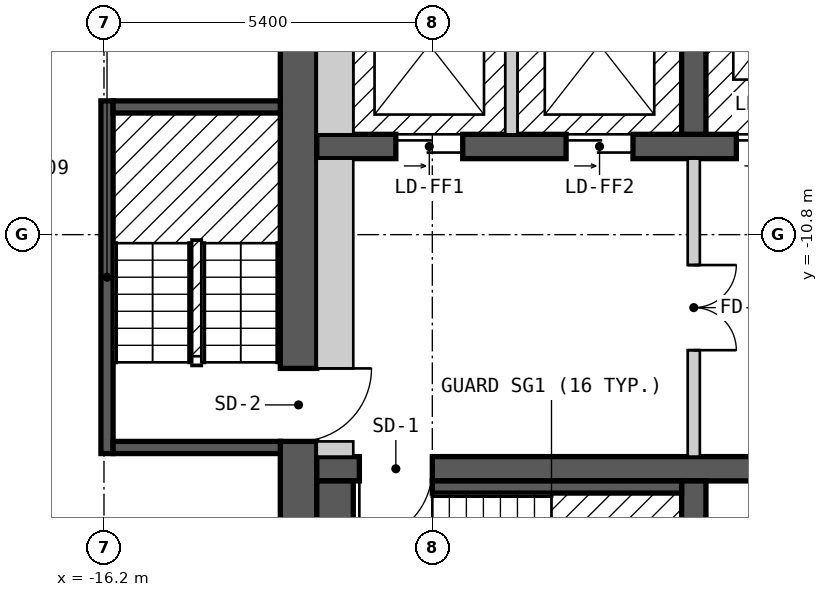
"""IFC4 building model, lengths in metres.
Left out: names, types, materials, properties, quantities, classifications, styles, units other than length and angle.
Written with IfcOpenShell. Run it as: python <this file> out.ifc"""

import sys

from ifc_helpers import new_model, si_unit, direction, frame, frame_2d, origin, origin_2d, place, context, subcontext, project, spatial, polyline, rectangle, outline, extrude, element, fill, save


model = new_model("IFC4")
c1 = context("Model", 3, precision=1e-05, world=origin(), true_north=direction((0.0, 1.0)))
c2 = subcontext(c1, "Body", "Model", "MODEL_VIEW")
j1 = project(units=[si_unit("LENGTHUNIT", "METRE"), si_unit("PLANEANGLEUNIT", "RADIAN")], contexts=[c1])
p1 = place(None, origin())
s1 = spatial("IfcSite", under=j1, at=p1, CompositionType="ELEMENT")
p2 = place(p1, origin())
s2 = spatial("IfcBuilding", under=s1, at=p2, CompositionType="ELEMENT")
p3 = place(p2, frame((0.0, 0.0, 163.2)))
s3 = spatial("IfcBuildingStorey", under=s2, at=p3, CompositionType="ELEMENT", Elevation=163.2)
p4 = place(p3, frame((-17.53, -15.736, 0.0), z_axis=(0.0, 0.0, 1.0), x_axis=(0.5, -0.866025403784, 0.0)))
e1 = element("IfcColumn", 1, at=p4, inside=s3, PredefinedType="COLUMN", context=c2, shape_type="SweptSolid", body=[
    extrude(rectangle(XDim=0.8, YDim=0.8, at=origin_2d()), origin(), (0.0, 0.0, 1.0), 3.0),
])
p5 = place(p3, frame((-13.0, -18.4, 0.0), z_axis=(0.0, 0.0, 1.0), x_axis=(0.0, 1.0, 0.0)))
e2 = element("IfcWall", 2, at=p5, inside=s3, PredefinedType="SHEAR", context=c2, shape_type="SweptSolid", body=[
    extrude(rectangle(XDim=12.8, YDim=0.6, at=frame_2d((6.4, 0.0))), origin(), (0.0, 0.0, 1.0), 2.7),
])
p6 = place(p5, frame((4.2, 0.0, 0.0)))
e3 = element("IfcOpeningElement", 3, at=p6, cuts=e2, PredefinedType="OPENING", context=c2, shape_type="SweptSolid", body=[
    extrude(rectangle(XDim=1.2, YDim=2.1, at=frame_2d((0.6, 1.05))), frame((0.0, 0.31, 0.0), z_axis=(0.0, -1.0, 0.0), x_axis=(1.0, 0.0, 0.0)), (0.0, 0.0, 1.0), 0.62),
])
p7 = place(p3, frame((-12.7, -14.65, 0.0), z_axis=(0.0, 0.0, 1.0), x_axis=(1.0, 0.0, 0.0)))
e4 = element("IfcWall", 4, at=p7, inside=s3, PredefinedType="SHEAR", context=c2, shape_type="SweptSolid", body=[
    extrude(rectangle(XDim=25.4, YDim=0.4, at=frame_2d((12.7, 0.0))), origin(), (0.0, 0.0, 1.0), 2.7),
])
p8 = place(p7, frame((1.9, 0.0, 0.0), z_axis=(0.0, 0.0, 1.0), x_axis=(-1.0, 0.0, 0.0)))
e5 = element("IfcOpeningElement", 5, at=p8, cuts=e4, PredefinedType="OPENING", context=c2, shape_type="SweptSolid", body=[
    extrude(rectangle(XDim=1.2, YDim=2.1, at=frame_2d((0.6, 1.05))), frame((0.0, 0.21, 0.0), z_axis=(0.0, -1.0, 0.0), x_axis=(1.0, 0.0, 0.0)), (0.0, 0.0, 1.0), 0.42),
])
p9 = place(p7, frame((24.75, 0.0, 0.0), z_axis=(0.0, 0.0, 1.0), x_axis=(-1.0, 0.0, 0.0)))
e6 = element("IfcOpeningElement", 6, at=p9, cuts=e4, PredefinedType="OPENING", context=c2, shape_type="SweptSolid", body=[
    extrude(rectangle(XDim=1.2, YDim=2.1, at=frame_2d((0.6, 1.05))), frame((0.0, 0.21, 0.0), z_axis=(0.0, -1.0, 0.0), x_axis=(1.0, 0.0, 0.0)), (0.0, 0.0, 1.0), 0.42),
])
p10 = place(p7, frame((8.6, 0.0, 0.0), z_axis=(0.0, 0.0, 1.0), x_axis=(-1.0, 0.0, 0.0)))
e7 = element("IfcOpeningElement", 7, at=p10, cuts=e4, PredefinedType="OPENING", context=c2, shape_type="SweptSolid", body=[
    extrude(rectangle(XDim=1.0, YDim=2.1, at=frame_2d((0.5, 1.05))), frame((0.0, 0.21, 0.0), z_axis=(0.0, -1.0, 0.0), x_axis=(1.0, 0.0, 0.0)), (0.0, 0.0, 1.0), 0.42),
])
p11 = place(p7, frame((11.35, 0.0, 0.0), z_axis=(0.0, 0.0, 1.0), x_axis=(-1.0, 0.0, 0.0)))
e8 = element("IfcOpeningElement", 8, at=p11, cuts=e4, PredefinedType="OPENING", context=c2, shape_type="SweptSolid", body=[
    extrude(rectangle(XDim=0.9, YDim=2.1, at=frame_2d((0.45, 1.05))), frame((0.0, 0.21, 0.0), z_axis=(0.0, -1.0, 0.0), x_axis=(1.0, 0.0, 0.0)), (0.0, 0.0, 1.0), 0.42),
])
p12 = place(p7, frame((14.15, 0.0, 0.0), z_axis=(0.0, 0.0, 1.0), x_axis=(-1.0, 0.0, 0.0)))
e9 = element("IfcOpeningElement", 9, at=p12, cuts=e4, PredefinedType="OPENING", context=c2, shape_type="SweptSolid", body=[
    extrude(rectangle(XDim=1.0, YDim=2.1, at=frame_2d((0.5, 1.05))), frame((0.0, 0.21, 0.0), z_axis=(0.0, -1.0, 0.0), x_axis=(1.0, 0.0, 0.0)), (0.0, 0.0, 1.0), 0.42),
])
p13 = place(p7, frame((17.75, 0.0, 0.0), z_axis=(0.0, 0.0, 1.0), x_axis=(-1.0, 0.0, 0.0)))
e10 = element("IfcOpeningElement", 10, at=p13, cuts=e4, PredefinedType="OPENING", context=c2, shape_type="SweptSolid", body=[
    extrude(rectangle(XDim=1.0, YDim=2.1, at=frame_2d((0.5, 1.05))), frame((0.0, 0.21, 0.0), z_axis=(0.0, -1.0, 0.0), x_axis=(1.0, 0.0, 0.0)), (0.0, 0.0, 1.0), 0.42),
])
p14 = place(p3, frame((-12.7, -9.35, 0.0), z_axis=(0.0, 0.0, 1.0), x_axis=(1.0, 0.0, 0.0)))
e11 = element("IfcWall", 11, at=p14, inside=s3, PredefinedType="SHEAR", context=c2, shape_type="SweptSolid", body=[
    extrude(rectangle(XDim=22.9, YDim=0.4, at=frame_2d((11.45, 0.0))), origin(), (0.0, 0.0, 1.0), 2.7),
])
p15 = place(p14, frame((1.3, 0.0, 0.0)))
e12 = element("IfcOpeningElement", 12, at=p15, cuts=e11, PredefinedType="OPENING", context=c2, shape_type="SweptSolid", body=[
    extrude(rectangle(XDim=1.1, YDim=2.1, at=frame_2d((0.55, 1.05))), frame((0.0, 0.21, 0.0), z_axis=(0.0, -1.0, 0.0), x_axis=(1.0, 0.0, 0.0)), (0.0, 0.0, 1.0), 0.42),
])
p16 = place(p14, frame((4.1, 0.0, 0.0)))
e13 = element("IfcOpeningElement", 13, at=p16, cuts=e11, PredefinedType="OPENING", context=c2, shape_type="SweptSolid", body=[
    extrude(rectangle(XDim=1.1, YDim=2.1, at=frame_2d((0.55, 1.05))), frame((0.0, 0.21, 0.0), z_axis=(0.0, -1.0, 0.0), x_axis=(1.0, 0.0, 0.0)), (0.0, 0.0, 1.0), 0.42),
])
p17 = place(p14, frame((6.9, 0.0, 0.0)))
e14 = element("IfcOpeningElement", 14, at=p17, cuts=e11, PredefinedType="OPENING", context=c2, shape_type="SweptSolid", body=[
    extrude(rectangle(XDim=1.1, YDim=2.1, at=frame_2d((0.55, 1.05))), frame((0.0, 0.21, 0.0), z_axis=(0.0, -1.0, 0.0), x_axis=(1.0, 0.0, 0.0)), (0.0, 0.0, 1.0), 0.42),
])
p18 = place(p14, frame((9.2, 0.0, 0.0)))
e15 = element("IfcOpeningElement", 15, at=p18, cuts=e11, PredefinedType="OPENING", context=c2, shape_type="SweptSolid", body=[
    extrude(rectangle(XDim=1.1, YDim=2.1, at=frame_2d((0.55, 1.05))), frame((0.0, 0.21, 0.0), z_axis=(0.0, -1.0, 0.0), x_axis=(1.0, 0.0, 0.0)), (0.0, 0.0, 1.0), 0.42),
])
p19 = place(p14, frame((11.5, 0.0, 0.0)))
e16 = element("IfcOpeningElement", 16, at=p19, cuts=e11, PredefinedType="OPENING", context=c2, shape_type="SweptSolid", body=[
    extrude(rectangle(XDim=1.1, YDim=2.1, at=frame_2d((0.55, 1.05))), frame((0.0, 0.21, 0.0), z_axis=(0.0, -1.0, 0.0), x_axis=(1.0, 0.0, 0.0)), (0.0, 0.0, 1.0), 0.42),
])
p20 = place(p14, frame((13.8, 0.0, 0.0)))
e17 = element("IfcOpeningElement", 17, at=p20, cuts=e11, PredefinedType="OPENING", context=c2, shape_type="SweptSolid", body=[
    extrude(rectangle(XDim=1.1, YDim=2.1, at=frame_2d((0.55, 1.05))), frame((0.0, 0.21, 0.0), z_axis=(0.0, -1.0, 0.0), x_axis=(1.0, 0.0, 0.0)), (0.0, 0.0, 1.0), 0.42),
])
p21 = place(p14, frame((16.1, 0.0, 0.0)))
e18 = element("IfcOpeningElement", 18, at=p21, cuts=e11, PredefinedType="OPENING", context=c2, shape_type="SweptSolid", body=[
    extrude(rectangle(XDim=1.1, YDim=2.1, at=frame_2d((0.55, 1.05))), frame((0.0, 0.21, 0.0), z_axis=(0.0, -1.0, 0.0), x_axis=(1.0, 0.0, 0.0)), (0.0, 0.0, 1.0), 0.42),
])
p22 = place(p14, frame((18.4, 0.0, 0.0)))
e19 = element("IfcOpeningElement", 19, at=p22, cuts=e11, PredefinedType="OPENING", context=c2, shape_type="SweptSolid", body=[
    extrude(rectangle(XDim=1.1, YDim=2.1, at=frame_2d((0.55, 1.05))), frame((0.0, 0.21, 0.0), z_axis=(0.0, -1.0, 0.0), x_axis=(1.0, 0.0, 0.0)), (0.0, 0.0, 1.0), 0.42),
])
p23 = place(p14, frame((20.8, 0.0, 0.0)))
e20 = element("IfcOpeningElement", 20, at=p23, cuts=e11, PredefinedType="OPENING", context=c2, shape_type="SweptSolid", body=[
    extrude(rectangle(XDim=1.1, YDim=2.1, at=frame_2d((0.55, 1.05))), frame((0.0, 0.21, 0.0), z_axis=(0.0, -1.0, 0.0), x_axis=(1.0, 0.0, 0.0)), (0.0, 0.0, 1.0), 0.42),
])
for number, where, z_axis, x_axis in (
    (21, (-6.5, -18.4, 0.0), (0.0, 0.0, 1.0), (0.0, 1.0, 0.0)),
    (22, (-6.5, -9.15, 0.0), (0.0, 0.0, 1.0), (0.0, 1.0, 0.0)),
):
    element("IfcWall", number, at=place(p3, frame(where, z_axis=z_axis, x_axis=x_axis)), inside=s3, PredefinedType="SHEAR", context=c2, shape_type="SweptSolid", body=[
        extrude(rectangle(XDim=3.55, YDim=0.4, at=frame_2d((1.775, 0.0))), origin(), (0.0, 0.0, 1.0), 2.7),
    ])
p24 = place(p3, frame((-26.024, -3.025, 0.0), z_axis=(0.0, 0.0, 1.0), x_axis=(0.500018670445, -0.86601462413, 0.0)))
e23 = element("IfcWall", 23, at=p24, inside=s3, PredefinedType="SOLIDWALL", context=c2, shape_type="SweptSolid", body=[
    extrude(outline(polyline([(0.0, -0.15), (20.785, -0.15), (20.705, 0.15), (0.08, 0.15), (0.0, -0.15)])), origin(), (0.0, 0.0, 1.0), 2.7),
])
p25 = place(p24, frame((2.346, 0.0, 0.15)))
e24 = element("IfcOpeningElement", 24, at=p25, cuts=e23, PredefinedType="OPENING", context=c2, shape_type="SweptSolid", body=[
    extrude(rectangle(XDim=1.5, YDim=2.1, at=frame_2d((0.75, 1.05))), frame((0.0, 0.16, 0.0), z_axis=(0.0, -1.0, 0.0), x_axis=(1.0, 0.0, 0.0)), (0.0, 0.0, 1.0), 0.32),
])
p26 = place(p24, frame((7.21, 0.0, 0.15)))
e25 = element("IfcOpeningElement", 25, at=p26, cuts=e23, PredefinedType="OPENING", context=c2, shape_type="SweptSolid", body=[
    extrude(rectangle(XDim=1.5, YDim=2.1, at=frame_2d((0.75, 1.05))), frame((0.0, 0.16, 0.0), z_axis=(0.0, -1.0, 0.0), x_axis=(1.0, 0.0, 0.0)), (0.0, 0.0, 1.0), 0.32),
])
p27 = place(p24, frame((12.073, 0.0, 0.15)))
e26 = element("IfcOpeningElement", 26, at=p27, cuts=e23, PredefinedType="OPENING", context=c2, shape_type="SweptSolid", body=[
    extrude(rectangle(XDim=1.5, YDim=2.1, at=frame_2d((0.75, 1.05))), frame((0.0, 0.16, 0.0), z_axis=(0.0, -1.0, 0.0), x_axis=(1.0, 0.0, 0.0)), (0.0, 0.0, 1.0), 0.32),
])
p28 = place(p24, frame((16.938, 0.0, 0.15)))
e27 = element("IfcOpeningElement", 27, at=p28, cuts=e23, PredefinedType="OPENING", context=c2, shape_type="SweptSolid", body=[
    extrude(rectangle(XDim=1.5, YDim=2.1, at=frame_2d((0.75, 1.05))), frame((0.0, 0.16, 0.0), z_axis=(0.0, -1.0, 0.0), x_axis=(1.0, 0.0, 0.0)), (0.0, 0.0, 1.0), 0.32),
])
p29 = place(p3, frame((-23.13, -7.737, 0.0), z_axis=(0.0, 0.0, 1.0), x_axis=(0.86598451299, 0.500070818246, 0.0)))
e28 = element("IfcWall", 28, at=p29, inside=s3, PredefinedType="PARTITIONING", context=c2, shape_type="SweptSolid", body=[
    extrude(rectangle(XDim=8.695, YDim=0.2, at=frame_2d((4.348, 0.0))), origin(), (0.0, 0.0, 1.0), 2.7),
])
p30 = place(p3, frame((-16.15, -14.4, 0.0), z_axis=(0.0, 0.0, 1.0), x_axis=(0.0, 1.0, 0.0)))
e29 = element("IfcWall", 29, at=p30, inside=s3, PredefinedType="SOLIDWALL", context=c2, shape_type="SweptSolid", body=[
    extrude(rectangle(XDim=5.8, YDim=0.2, at=frame_2d((2.9, 0.0))), origin(), (0.0, 0.0, 1.0), 2.7),
])
for number, where, z_axis, x_axis in (
    (30, (-16.05, -14.3, 0.0), (0.0, 0.0, 1.0), (1.0, 0.0, 0.0)),
    (31, (-16.05, -8.7, 0.0), (0.0, 0.0, 1.0), (1.0, 0.0, 0.0)),
):
    element("IfcWall", number, at=place(p3, frame(where, z_axis=z_axis, x_axis=x_axis)), inside=s3, PredefinedType="SOLIDWALL", context=c2, shape_type="SweptSolid", body=[
        extrude(rectangle(XDim=2.75, YDim=0.2, at=frame_2d((1.375, 0.0))), origin(), (0.0, 0.0, 1.0), 2.7),
    ])
p31 = place(p3, frame((-12.4, -18.4, 0.0), z_axis=(0.0, 0.0, 1.0), x_axis=(0.0, 1.0, 0.0)))
e32 = element("IfcWall", 32, at=p31, inside=s3, PredefinedType="SOLIDWALL", context=c2, shape_type="SweptSolid", body=[
    extrude(rectangle(XDim=3.55, YDim=0.6, at=frame_2d((1.775, 0.0))), origin(), (0.0, 0.0, 1.0), 2.7),
])
p32 = place(p3, frame((-12.7, -14.325, 0.0), z_axis=(0.0, 0.0, 1.0), x_axis=(1.0, 0.0, 0.0)))
e33 = element("IfcWall", 33, at=p32, inside=s3, PredefinedType="PARTITIONING", context=c2, shape_type="SweptSolid", body=[
    extrude(rectangle(XDim=0.6, YDim=0.25, at=frame_2d((0.3, 0.0))), origin(), (0.0, 0.0, 1.0), 2.7),
])
p33 = place(p3, frame((-12.4, -13.0, 0.0), z_axis=(0.0, 0.0, 1.0), x_axis=(0.0, 1.0, 0.0)))
e34 = element("IfcWall", 34, at=p33, inside=s3, PredefinedType="PARTITIONING", context=c2, shape_type="SweptSolid", body=[
    extrude(rectangle(XDim=3.45, YDim=0.6, at=frame_2d((1.725, 0.0))), origin(), (0.0, 0.0, 1.0), 2.7),
])
p34 = place(p3, frame((-12.4, -9.15, 0.0), z_axis=(0.0, 0.0, 1.0), x_axis=(0.0, 1.0, 0.0)))
e35 = element("IfcWall", 35, at=p34, inside=s3, PredefinedType="SOLIDWALL", context=c2, shape_type="SweptSolid", body=[
    extrude(rectangle(XDim=3.55, YDim=0.6, at=frame_2d((1.775, 0.0))), origin(), (0.0, 0.0, 1.0), 2.7),
])
p35 = place(p3, frame((-10.8, -14.95, 0.0), z_axis=(0.0, 0.0, 1.0), x_axis=(1.0, 0.0, 0.0)))
e36 = element("IfcWall", 36, at=p35, inside=s3, PredefinedType="SOLIDWALL", context=c2, shape_type="SweptSolid", body=[
    extrude(rectangle(XDim=4.1, YDim=0.2, at=frame_2d((2.05, 0.0))), origin(), (0.0, 0.0, 1.0), 2.7),
])
p36 = place(p3, frame((-9.5, -9.15, 0.0), z_axis=(0.0, 0.0, 1.0), x_axis=(0.0, 1.0, 0.0)))
e37 = element("IfcWall", 37, at=p36, inside=s3, PredefinedType="SOLIDWALL", context=c2, shape_type="SweptSolid", body=[
    extrude(rectangle(XDim=2.95, YDim=0.2, at=frame_2d((1.475, 0.0))), origin(), (0.0, 0.0, 1.0), 2.7),
])
p37 = place(p3, frame((-6.5, -14.45, 0.0), z_axis=(0.0, 0.0, 1.0), x_axis=(0.0, 1.0, 0.0)))
e38 = element("IfcWall", 38, at=p37, inside=s3, PredefinedType="PARTITIONING", context=c2, shape_type="SweptSolid", body=[
    extrude(rectangle(XDim=4.9, YDim=0.2, at=frame_2d((2.45, 0.0))), origin(), (0.0, 0.0, 1.0), 2.7),
])
p38 = place(p37, frame((3.15, 0.0, 0.0), z_axis=(0.0, 0.0, 1.0), x_axis=(-1.0, 0.0, 0.0)))
e39 = element("IfcOpeningElement", 39, at=p38, cuts=e38, PredefinedType="OPENING", context=c2, shape_type="SweptSolid", body=[
    extrude(rectangle(XDim=1.4, YDim=2.1, at=frame_2d((0.7, 1.05))), frame((0.0, 0.11, 0.0), z_axis=(0.0, -1.0, 0.0), x_axis=(1.0, 0.0, 0.0)), (0.0, 0.0, 1.0), 0.22),
])
p39 = place(p15, origin())
e40 = element("IfcDoor", 40, at=p39, inside=s3, OperationType="DOUBLE_DOOR_SLIDING", PredefinedType="DOOR", context=c2, shape_type="SweptSolid", body=[
    extrude(rectangle(XDim=1.1, YDim=2.1, at=frame_2d((0.55, 1.05))), frame((0.0, 0.025, 0.0), z_axis=(0.0, -1.0, 0.0), x_axis=(1.0, 0.0, 0.0)), (0.0, 0.0, 1.0), 0.05),
])
fill(e12, e40)
p40 = place(p16, origin())
e41 = element("IfcDoor", 41, at=p40, inside=s3, OperationType="DOUBLE_DOOR_SLIDING", PredefinedType="DOOR", context=c2, shape_type="SweptSolid", body=[
    extrude(rectangle(XDim=1.1, YDim=2.1, at=frame_2d((0.55, 1.05))), frame((0.0, 0.025, 0.0), z_axis=(0.0, -1.0, 0.0), x_axis=(1.0, 0.0, 0.0)), (0.0, 0.0, 1.0), 0.05),
])
fill(e13, e41)
p41 = place(p17, origin())
e42 = element("IfcDoor", 42, at=p41, inside=s3, OperationType="DOUBLE_DOOR_SLIDING", PredefinedType="DOOR", context=c2, shape_type="SweptSolid", body=[
    extrude(rectangle(XDim=1.1, YDim=2.1, at=frame_2d((0.55, 1.05))), frame((0.0, 0.025, 0.0), z_axis=(0.0, -1.0, 0.0), x_axis=(1.0, 0.0, 0.0)), (0.0, 0.0, 1.0), 0.05),
])
fill(e14, e42)
p42 = place(p8, origin())
e43 = element("IfcDoor", 43, at=p42, inside=s3, OperationType="SINGLE_SWING_RIGHT", PredefinedType="DOOR", context=c2, shape_type="SweptSolid", body=[
    extrude(rectangle(XDim=1.2, YDim=2.1, at=frame_2d((0.6, 1.05))), frame((0.0, 0.025, 0.0), z_axis=(0.0, -1.0, 0.0), x_axis=(1.0, 0.0, 0.0)), (0.0, 0.0, 1.0), 0.05),
])
fill(e5, e43)
p43 = place(p6, origin())
e44 = element("IfcDoor", 44, at=p43, inside=s3, OperationType="SINGLE_SWING_RIGHT", PredefinedType="DOOR", context=c2, shape_type="SweptSolid", body=[
    extrude(rectangle(XDim=1.2, YDim=2.1, at=frame_2d((0.6, 1.05))), frame((0.0, 0.025, 0.0), z_axis=(0.0, -1.0, 0.0), x_axis=(1.0, 0.0, 0.0)), (0.0, 0.0, 1.0), 0.05),
])
fill(e3, e44)
p44 = place(p38, origin())
e45 = element("IfcDoor", 45, at=p44, inside=s3, OperationType="DOUBLE_DOOR_SINGLE_SWING", PredefinedType="DOOR", context=c2, shape_type="SweptSolid", body=[
    extrude(rectangle(XDim=1.4, YDim=2.1, at=frame_2d((0.7, 1.05))), frame((0.0, 0.025, 0.0), z_axis=(0.0, -1.0, 0.0), x_axis=(1.0, 0.0, 0.0)), (0.0, 0.0, 1.0), 0.05),
])
fill(e39, e45)
save(model, sys.argv[1])
